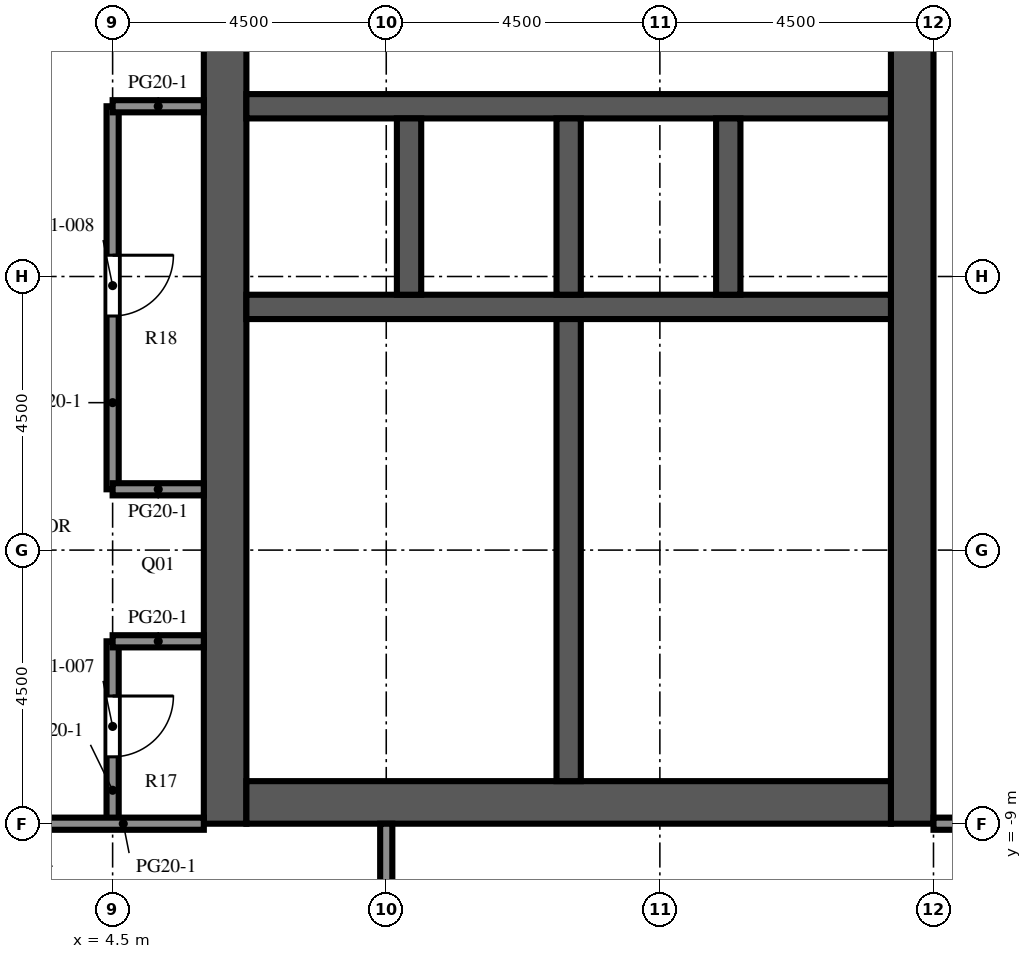
"""IFC4 building model, lengths in metres.
Left out: names, types, materials, properties, quantities, classifications, styles, units other than length and angle.
Written with IfcOpenShell. Run it as: python <this file> out.ifc"""

import sys

from ifc_helpers import new_model, si_unit, direction, frame, frame_2d, origin, place, context, subcontext, project, spatial, rectangle, extrude, element, fill, save


model = new_model("IFC4")
c1 = context("Model", 3, precision=1e-05, world=origin(), true_north=direction((0.0, 1.0)))
c2 = subcontext(c1, "Body", "Model", "MODEL_VIEW")
j1 = project(units=[si_unit("LENGTHUNIT", "METRE"), si_unit("PLANEANGLEUNIT", "RADIAN")], contexts=[c1])
p1 = place(None, origin())
s1 = spatial("IfcSite", under=j1, at=p1, CompositionType="ELEMENT")
p2 = place(p1, origin())
s2 = spatial("IfcBuilding", under=s1, at=p2, CompositionType="ELEMENT")
p3 = place(p2, frame((0.0, 0.0, 274.5)))
s3 = spatial("IfcBuildingStorey", under=s2, at=p3, CompositionType="ELEMENT", Elevation=274.5)
p4 = place(p3, frame((6.35, -9.0, 0.0), z_axis=(0.0, 0.0, 1.0), x_axis=(0.0, 1.0, 0.0)))
e1 = element("IfcWall", 1, at=p4, inside=s3, PredefinedType="SHEAR", context=c2, shape_type="SweptSolid", body=[
    extrude(rectangle(XDim=27.5, YDim=0.7, at=frame_2d((13.75, 0.0))), origin(), (0.0, 0.0, 1.0), 4.1),
])
p5 = place(p4, frame((12.55, 0.0, 0.0)))
e2 = element("IfcOpeningElement", 2, at=p5, cuts=e1, PredefinedType="OPENING", context=c2, shape_type="SweptSolid", body=[
    extrude(rectangle(XDim=2.4, YDim=2.4, at=frame_2d((1.2, 1.2))), frame((0.0, 0.36, 0.0), z_axis=(0.0, -1.0, 0.0), x_axis=(1.0, 0.0, 0.0)), (0.0, 0.0, 1.0), 0.72),
])
p6 = place(p4, frame((3.9, 0.0, 0.0)))
e3 = element("IfcOpeningElement", 3, at=p6, cuts=e1, PredefinedType="OPENING", context=c2, shape_type="SweptSolid", body=[
    extrude(rectangle(XDim=1.2, YDim=2.1, at=frame_2d((0.6, 1.05))), frame((0.0, 0.36, 0.0), z_axis=(0.0, -1.0, 0.0), x_axis=(1.0, 0.0, 0.0)), (0.0, 0.0, 1.0), 0.72),
])
p7 = place(p4, frame((19.46, 0.0, 0.0)))
e4 = element("IfcOpeningElement", 4, at=p7, cuts=e1, PredefinedType="OPENING", context=c2, shape_type="SweptSolid", body=[
    extrude(rectangle(XDim=1.0, YDim=2.1, at=frame_2d((0.5, 1.05))), frame((0.0, 0.36, 0.0), z_axis=(0.0, -1.0, 0.0), x_axis=(1.0, 0.0, 0.0)), (0.0, 0.0, 1.0), 0.72),
])
p8 = place(p4, frame((21.17, 0.0, 0.0)))
e5 = element("IfcOpeningElement", 5, at=p8, cuts=e1, PredefinedType="OPENING", context=c2, shape_type="SweptSolid", body=[
    extrude(rectangle(XDim=1.0, YDim=2.1, at=frame_2d((0.5, 1.05))), frame((0.0, 0.36, 0.0), z_axis=(0.0, -1.0, 0.0), x_axis=(1.0, 0.0, 0.0)), (0.0, 0.0, 1.0), 0.72),
])
p9 = place(p4, frame((23.26, 0.0, 0.0)))
e6 = element("IfcOpeningElement", 6, at=p9, cuts=e1, PredefinedType="OPENING", context=c2, shape_type="SweptSolid", body=[
    extrude(rectangle(XDim=1.0, YDim=2.1, at=frame_2d((0.5, 1.05))), frame((0.0, 0.36, 0.0), z_axis=(0.0, -1.0, 0.0), x_axis=(1.0, 0.0, 0.0)), (0.0, 0.0, 1.0), 0.72),
])
p10 = place(p4, frame((25.35, 0.0, 0.0)))
e7 = element("IfcOpeningElement", 7, at=p10, cuts=e1, PredefinedType="OPENING", context=c2, shape_type="SweptSolid", body=[
    extrude(rectangle(XDim=1.0, YDim=2.1, at=frame_2d((0.5, 1.05))), frame((0.0, 0.36, 0.0), z_axis=(0.0, -1.0, 0.0), x_axis=(1.0, 0.0, 0.0)), (0.0, 0.0, 1.0), 0.72),
])
p11 = place(p3, frame((17.65, -9.0, 0.0), z_axis=(0.0, 0.0, 1.0), x_axis=(0.0, 1.0, 0.0)))
e8 = element("IfcWall", 8, at=p11, inside=s3, PredefinedType="SHEAR", context=c2, shape_type="SweptSolid", body=[
    extrude(rectangle(XDim=27.5, YDim=0.7, at=frame_2d((13.75, 0.0))), origin(), (0.0, 0.0, 1.0), 4.1),
])
p12 = place(p11, frame((12.55, 0.0, 0.0)))
e9 = element("IfcOpeningElement", 9, at=p12, cuts=e8, PredefinedType="OPENING", context=c2, shape_type="SweptSolid", body=[
    extrude(rectangle(XDim=2.4, YDim=2.4, at=frame_2d((1.2, 1.2))), frame((0.0, 0.36, 0.0), z_axis=(0.0, -1.0, 0.0), x_axis=(1.0, 0.0, 0.0)), (0.0, 0.0, 1.0), 0.72),
])
p13 = place(p11, frame((6.825, 0.0, 0.0)))
e10 = element("IfcOpeningElement", 10, at=p13, cuts=e8, PredefinedType="OPENING", context=c2, shape_type="SweptSolid", body=[
    extrude(rectangle(XDim=1.2, YDim=2.1, at=frame_2d((0.6, 1.05))), frame((0.0, 0.36, 0.0), z_axis=(0.0, -1.0, 0.0), x_axis=(1.0, 0.0, 0.0)), (0.0, 0.0, 1.0), 0.72),
])
p14 = place(p11, frame((19.475, 0.0, 0.0)))
e11 = element("IfcOpeningElement", 11, at=p14, cuts=e8, PredefinedType="OPENING", context=c2, shape_type="SweptSolid", body=[
    extrude(rectangle(XDim=1.2, YDim=2.1, at=frame_2d((0.6, 1.05))), frame((0.0, 0.36, 0.0), z_axis=(0.0, -1.0, 0.0), x_axis=(1.0, 0.0, 0.0)), (0.0, 0.0, 1.0), 0.72),
])
p15 = place(p3, frame((6.7, -8.65, 0.0), z_axis=(0.0, 0.0, 1.0), x_axis=(1.0, 0.0, 0.0)))
e12 = element("IfcWall", 12, at=p15, inside=s3, PredefinedType="SHEAR", context=c2, shape_type="SweptSolid", body=[
    extrude(rectangle(XDim=10.6, YDim=0.7, at=frame_2d((5.3, 0.0))), origin(), (0.0, 0.0, 1.0), 4.1),
])
p16 = place(p3, frame((6.7, -0.5, 0.0), z_axis=(0.0, 0.0, 1.0), x_axis=(1.0, 0.0, 0.0)))
e13 = element("IfcWall", 13, at=p16, inside=s3, PredefinedType="SHEAR", context=c2, shape_type="SweptSolid", body=[
    extrude(rectangle(XDim=10.6, YDim=0.4, at=frame_2d((5.3, 0.0))), origin(), (0.0, 0.0, 1.0), 4.1),
])
p17 = place(p3, frame((6.7, 2.8, 0.0), z_axis=(0.0, 0.0, 1.0), x_axis=(1.0, 0.0, 0.0)))
e14 = element("IfcWall", 14, at=p17, inside=s3, PredefinedType="SHEAR", context=c2, shape_type="SweptSolid", body=[
    extrude(rectangle(XDim=10.6, YDim=0.4, at=frame_2d((5.3, 0.0))), origin(), (0.0, 0.0, 1.0), 4.1),
])
p18 = place(p17, frame((0.688, 0.0, 0.0)))
e15 = element("IfcOpeningElement", 15, at=p18, cuts=e14, PredefinedType="OPENING", context=c2, shape_type="SweptSolid", body=[
    extrude(rectangle(XDim=1.1, YDim=2.1, at=frame_2d((0.55, 1.05))), frame((0.0, 0.21, 0.0), z_axis=(0.0, -1.0, 0.0), x_axis=(1.0, 0.0, 0.0)), (0.0, 0.0, 1.0), 0.42),
])
p19 = place(p17, frame((3.438, 0.0, 0.0)))
e16 = element("IfcOpeningElement", 16, at=p19, cuts=e14, PredefinedType="OPENING", context=c2, shape_type="SweptSolid", body=[
    extrude(rectangle(XDim=1.1, YDim=2.1, at=frame_2d((0.55, 1.05))), frame((0.0, 0.21, 0.0), z_axis=(0.0, -1.0, 0.0), x_axis=(1.0, 0.0, 0.0)), (0.0, 0.0, 1.0), 0.42),
])
p20 = place(p17, frame((6.113, 0.0, 0.0)))
e17 = element("IfcOpeningElement", 17, at=p20, cuts=e14, PredefinedType="OPENING", context=c2, shape_type="SweptSolid", body=[
    extrude(rectangle(XDim=1.0, YDim=2.1, at=frame_2d((0.5, 1.05))), frame((0.0, 0.21, 0.0), z_axis=(0.0, -1.0, 0.0), x_axis=(1.0, 0.0, 0.0)), (0.0, 0.0, 1.0), 0.42),
])
p21 = place(p17, frame((8.863, 0.0, 0.0)))
e18 = element("IfcOpeningElement", 18, at=p21, cuts=e14, PredefinedType="OPENING", context=c2, shape_type="SweptSolid", body=[
    extrude(rectangle(XDim=1.0, YDim=2.1, at=frame_2d((0.5, 1.05))), frame((0.0, 0.21, 0.0), z_axis=(0.0, -1.0, 0.0), x_axis=(1.0, 0.0, 0.0)), (0.0, 0.0, 1.0), 0.42),
])
for number, where, z_axis, x_axis in (
    (19, (9.375, -0.3, 0.0), (0.0, 0.0, 1.0), (0.0, 1.0, 0.0)),
    (20, (12.0, -0.3, 0.0), (0.0, 0.0, 1.0), (0.0, 1.0, 0.0)),
    (21, (14.625, -0.3, 0.0), (0.0, 0.0, 1.0), (0.0, 1.0, 0.0)),
):
    element("IfcWall", number, at=place(p3, frame(where, z_axis=z_axis, x_axis=x_axis)), inside=s3, PredefinedType="SHEAR", context=c2, shape_type="SweptSolid", body=[
        extrude(rectangle(XDim=2.9, YDim=0.4, at=frame_2d((1.45, 0.0))), origin(), (0.0, 0.0, 1.0), 4.1),
    ])
p22 = place(p3, frame((12.0, -8.3, 0.0), z_axis=(0.0, 0.0, 1.0), x_axis=(0.0, 1.0, 0.0)))
e22 = element("IfcWall", 22, at=p22, inside=s3, PredefinedType="SHEAR", context=c2, shape_type="SweptSolid", body=[
    extrude(rectangle(XDim=7.6, YDim=0.4, at=frame_2d((3.8, 0.0))), origin(), (0.0, 0.0, 1.0), 4.1),
])
p23 = place(p3, frame((6.7, -6.02, 0.0), z_axis=(0.0, 0.0, 1.0), x_axis=(1.0, 0.0, 0.0)))
e23 = element("IfcWall", 23, at=p23, inside=s3, PredefinedType="PARTITIONING", context=c2, shape_type="SweptSolid", body=[
    extrude(rectangle(XDim=1.6, YDim=0.1, at=frame_2d((0.8, 0.0))), origin(), (0.0, 0.0, 1.0), 3.65),
])
p24 = place(p23, frame((0.3, 0.0, 0.0)))
e24 = element("IfcOpeningElement", 24, at=p24, cuts=e23, PredefinedType="OPENING", context=c2, shape_type="SweptSolid", body=[
    extrude(rectangle(XDim=1.0, YDim=2.1, at=frame_2d((0.5, 1.05))), frame((0.0, 0.06, 0.0), z_axis=(0.0, -1.0, 0.0), x_axis=(1.0, 0.0, 0.0)), (0.0, 0.0, 1.0), 0.12),
])
p25 = place(p3, frame((6.7, -2.98, 0.0), z_axis=(0.0, 0.0, 1.0), x_axis=(1.0, 0.0, 0.0)))
e25 = element("IfcWall", 25, at=p25, inside=s3, PredefinedType="PARTITIONING", context=c2, shape_type="SweptSolid", body=[
    extrude(rectangle(XDim=1.6, YDim=0.1, at=frame_2d((0.8, 0.0))), origin(), (0.0, 0.0, 1.0), 3.65),
])
p26 = place(p25, frame((0.3, 0.0, 0.0)))
e26 = element("IfcOpeningElement", 26, at=p26, cuts=e25, PredefinedType="OPENING", context=c2, shape_type="SweptSolid", body=[
    extrude(rectangle(XDim=1.0, YDim=2.1, at=frame_2d((0.5, 1.05))), frame((0.0, 0.06, 0.0), z_axis=(0.0, -1.0, 0.0), x_axis=(1.0, 0.0, 0.0)), (0.0, 0.0, 1.0), 0.12),
])
p27 = place(p3, frame((8.3, -6.02, 0.0), z_axis=(0.0, 0.0, 1.0), x_axis=(0.0, 1.0, 0.0)))
e27 = element("IfcWall", 27, at=p27, inside=s3, PredefinedType="PARTITIONING", context=c2, shape_type="SweptSolid", body=[
    extrude(rectangle(XDim=3.04, YDim=0.1, at=frame_2d((1.52, 0.0))), origin(), (0.0, 0.0, 1.0), 3.65),
])
p28 = place(p27, frame((1.02, 0.0, 0.0)))
e28 = element("IfcOpeningElement", 28, at=p28, cuts=e27, PredefinedType="OPENING", context=c2, shape_type="SweptSolid", body=[
    extrude(rectangle(XDim=1.0, YDim=2.1, at=frame_2d((0.5, 1.05))), frame((0.0, 0.06, 0.0), z_axis=(0.0, -1.0, 0.0), x_axis=(1.0, 0.0, 0.0)), (0.0, 0.0, 1.0), 0.12),
])
for number, where, z_axis, x_axis in (
    (29, (8.3, -6.02, 0.0), (0.0, 0.0, 1.0), (1.0, 0.0, 0.0)),
    (30, (8.3, -2.98, 0.0), (0.0, 0.0, 1.0), (1.0, 0.0, 0.0)),
):
    element("IfcWall", number, at=place(p3, frame(where, z_axis=z_axis, x_axis=x_axis)), inside=s3, PredefinedType="PARTITIONING", context=c2, shape_type="SweptSolid", body=[
        extrude(rectangle(XDim=3.5, YDim=0.1, at=frame_2d((1.75, 0.0))), origin(), (0.0, 0.0, 1.0), 3.65),
    ])
p29 = place(p3, frame((4.5, -6.0, 0.0), z_axis=(0.0, 0.0, 1.0), x_axis=(0.0, -1.0, 0.0)))
e31 = element("IfcWall", 31, at=p29, inside=s3, PredefinedType="PARTITIONING", context=c2, shape_type="SweptSolid", body=[
    extrude(rectangle(XDim=3.0, YDim=0.2, at=frame_2d((1.5, 0.0))), origin(), (0.0, 0.0, 1.0), 3.65),
])
p30 = place(p29, frame((0.9, 0.0, 0.0)))
e32 = element("IfcOpeningElement", 32, at=p30, cuts=e31, PredefinedType="OPENING", context=c2, shape_type="SweptSolid", body=[
    extrude(rectangle(XDim=1.0, YDim=2.1, at=frame_2d((0.5, 1.05))), frame((0.0, 0.11, 0.0), z_axis=(0.0, -1.0, 0.0), x_axis=(1.0, 0.0, 0.0)), (0.0, 0.0, 1.0), 0.22),
])
p31 = place(p3, frame((4.5, 2.8, 0.0), z_axis=(0.0, 0.0, 1.0), x_axis=(0.0, -1.0, 0.0)))
e33 = element("IfcWall", 33, at=p31, inside=s3, PredefinedType="PARTITIONING", context=c2, shape_type="SweptSolid", body=[
    extrude(rectangle(XDim=6.3, YDim=0.2, at=frame_2d((3.15, 0.0))), origin(), (0.0, 0.0, 1.0), 3.65),
])
p32 = place(p31, frame((2.45, 0.0, 0.0)))
e34 = element("IfcOpeningElement", 34, at=p32, cuts=e33, PredefinedType="OPENING", context=c2, shape_type="SweptSolid", body=[
    extrude(rectangle(XDim=1.0, YDim=2.1, at=frame_2d((0.5, 1.05))), frame((0.0, 0.11, 0.0), z_axis=(0.0, -1.0, 0.0), x_axis=(1.0, 0.0, 0.0)), (0.0, 0.0, 1.0), 0.22),
])
p33 = place(p3, frame((9.0, -17.6, 0.0), z_axis=(0.0, 0.0, 1.0), x_axis=(0.0, 1.0, 0.0)))
e35 = element("IfcWall", 35, at=p33, inside=s3, PredefinedType="PARTITIONING", context=c2, shape_type="SweptSolid", body=[
    extrude(rectangle(XDim=8.6, YDim=0.2, at=frame_2d((4.3, 0.0))), origin(), (0.0, 0.0, 1.0), 3.65),
])
p34 = place(p3, frame((6.0, -9.0, 0.0), z_axis=(0.0, 0.0, 1.0), x_axis=(-1.0, 0.0, 0.0)))
e36 = element("IfcWall", 36, at=p34, inside=s3, PredefinedType="PARTITIONING", context=c2, shape_type="SweptSolid", body=[
    extrude(rectangle(XDim=4.5, YDim=0.2, at=frame_2d((2.25, 0.0))), origin(), (0.0, 0.0, 1.0), 3.65),
])
p35 = place(p34, frame((2.65, 0.0, 0.0)))
e37 = element("IfcOpeningElement", 37, at=p35, cuts=e36, PredefinedType="OPENING", context=c2, shape_type="SweptSolid", body=[
    extrude(rectangle(XDim=1.0, YDim=2.1, at=frame_2d((0.5, 1.05))), frame((0.0, 0.11, 0.0), z_axis=(0.0, -1.0, 0.0), x_axis=(1.0, 0.0, 0.0)), (0.0, 0.0, 1.0), 0.22),
])
p36 = place(p3, frame((22.1, -9.0, 0.0), z_axis=(0.0, 0.0, 1.0), x_axis=(-1.0, 0.0, 0.0)))
e38 = element("IfcWall", 38, at=p36, inside=s3, PredefinedType="PARTITIONING", context=c2, shape_type="SweptSolid", body=[
    extrude(rectangle(XDim=4.1, YDim=0.2, at=frame_2d((2.05, 0.0))), origin(), (0.0, 0.0, 1.0), 3.65),
])
p37 = place(p36, frame((0.75, 0.0, 0.0)))
e39 = element("IfcOpeningElement", 39, at=p37, cuts=e38, PredefinedType="OPENING", context=c2, shape_type="SweptSolid", body=[
    extrude(rectangle(XDim=1.0, YDim=2.1, at=frame_2d((0.5, 1.05))), frame((0.0, 0.11, 0.0), z_axis=(0.0, -1.0, 0.0), x_axis=(1.0, 0.0, 0.0)), (0.0, 0.0, 1.0), 0.22),
])
for number, where, z_axis, x_axis in (
    (40, (4.5, -6.0, 0.0), (0.0, 0.0, 1.0), (1.0, 0.0, 0.0)),
    (41, (4.5, -3.5, 0.0), (0.0, 0.0, 1.0), (1.0, 0.0, 0.0)),
    (42, (4.5, 2.8, 0.0), (0.0, 0.0, 1.0), (1.0, 0.0, 0.0)),
):
    element("IfcWall", number, at=place(p3, frame(where, z_axis=z_axis, x_axis=x_axis)), inside=s3, PredefinedType="PARTITIONING", context=c2, shape_type="SweptSolid", body=[
        extrude(rectangle(XDim=1.5, YDim=0.2, at=frame_2d((0.75, 0.0))), origin(), (0.0, 0.0, 1.0), 3.65),
    ])
p38 = place(p18, origin())
e43 = element("IfcDoor", 43, at=p38, inside=s3, OperationType="DOUBLE_DOOR_SLIDING", PredefinedType="DOOR", context=c2, shape_type="SweptSolid", body=[
    extrude(rectangle(XDim=1.1, YDim=2.1, at=frame_2d((0.55, 1.05))), frame((0.0, 0.025, 0.0), z_axis=(0.0, -1.0, 0.0), x_axis=(1.0, 0.0, 0.0)), (0.0, 0.0, 1.0), 0.05),
])
fill(e15, e43)
p39 = place(p19, origin())
e44 = element("IfcDoor", 44, at=p39, inside=s3, OperationType="DOUBLE_DOOR_SLIDING", PredefinedType="DOOR", context=c2, shape_type="SweptSolid", body=[
    extrude(rectangle(XDim=1.1, YDim=2.1, at=frame_2d((0.55, 1.05))), frame((0.0, 0.025, 0.0), z_axis=(0.0, -1.0, 0.0), x_axis=(1.0, 0.0, 0.0)), (0.0, 0.0, 1.0), 0.05),
])
fill(e16, e44)
p40 = place(p5, origin())
e45 = element("IfcDoor", 45, at=p40, inside=s3, OperationType="DOUBLE_DOOR_DOUBLE_SWING", PredefinedType="DOOR", context=c2, shape_type="SweptSolid", body=[
    extrude(rectangle(XDim=2.4, YDim=2.4, at=frame_2d((1.2, 1.2))), frame((0.0, 0.025, 0.0), z_axis=(0.0, -1.0, 0.0), x_axis=(1.0, 0.0, 0.0)), (0.0, 0.0, 1.0), 0.05),
])
fill(e2, e45)
p41 = place(p12, origin())
e46 = element("IfcDoor", 46, at=p41, inside=s3, OperationType="DOUBLE_DOOR_DOUBLE_SWING", PredefinedType="DOOR", context=c2, shape_type="SweptSolid", body=[
    extrude(rectangle(XDim=2.4, YDim=2.4, at=frame_2d((1.2, 1.2))), frame((0.0, 0.025, 0.0), z_axis=(0.0, -1.0, 0.0), x_axis=(1.0, 0.0, 0.0)), (0.0, 0.0, 1.0), 0.05),
])
fill(e9, e46)
p42 = place(p13, frame((1.2, 0.0, 0.0), z_axis=(0.0, 0.0, 1.0), x_axis=(-1.0, 0.0, 0.0)))
e47 = element("IfcDoor", 47, at=p42, inside=s3, OperationType="SINGLE_SWING_LEFT", PredefinedType="DOOR", context=c2, shape_type="SweptSolid", body=[
    extrude(rectangle(XDim=1.2, YDim=2.1, at=frame_2d((0.6, 1.05))), frame((0.0, 0.025, 0.0), z_axis=(0.0, -1.0, 0.0), x_axis=(1.0, 0.0, 0.0)), (0.0, 0.0, 1.0), 0.05),
])
fill(e10, e47)
p43 = place(p20, origin())
e48 = element("IfcDoor", 48, at=p43, inside=s3, OperationType="SINGLE_SWING_LEFT", PredefinedType="DOOR", context=c2, shape_type="SweptSolid", body=[
    extrude(rectangle(XDim=1.0, YDim=2.1, at=frame_2d((0.5, 1.05))), frame((0.0, 0.025, 0.0), z_axis=(0.0, -1.0, 0.0), x_axis=(1.0, 0.0, 0.0)), (0.0, 0.0, 1.0), 0.05),
])
fill(e17, e48)
p44 = place(p21, origin())
e49 = element("IfcDoor", 49, at=p44, inside=s3, OperationType="SINGLE_SWING_RIGHT", PredefinedType="DOOR", context=c2, shape_type="SweptSolid", body=[
    extrude(rectangle(XDim=1.0, YDim=2.1, at=frame_2d((0.5, 1.05))), frame((0.0, 0.025, 0.0), z_axis=(0.0, -1.0, 0.0), x_axis=(1.0, 0.0, 0.0)), (0.0, 0.0, 1.0), 0.05),
])
fill(e18, e49)
p45 = place(p6, origin())
e50 = element("IfcDoor", 50, at=p45, inside=s3, OperationType="SINGLE_SWING_RIGHT", PredefinedType="DOOR", context=c2, shape_type="SweptSolid", body=[
    extrude(rectangle(XDim=1.2, YDim=2.1, at=frame_2d((0.6, 1.05))), frame((0.0, -0.275, 0.0), z_axis=(0.0, -1.0, 0.0), x_axis=(1.0, 0.0, 0.0)), (0.0, 0.0, 1.0), 0.05),
])
fill(e3, e50)
p46 = place(p24, origin())
e51 = element("IfcDoor", 51, at=p46, inside=s3, OperationType="SINGLE_SWING_LEFT", PredefinedType="DOOR", context=c2, shape_type="SweptSolid", body=[
    extrude(rectangle(XDim=1.0, YDim=2.1, at=frame_2d((0.5, 1.05))), frame((0.0, 0.025, 0.0), z_axis=(0.0, -1.0, 0.0), x_axis=(1.0, 0.0, 0.0)), (0.0, 0.0, 1.0), 0.05),
])
fill(e24, e51)
p47 = place(p26, origin())
e52 = element("IfcDoor", 52, at=p47, inside=s3, OperationType="SINGLE_SWING_RIGHT", PredefinedType="DOOR", context=c2, shape_type="SweptSolid", body=[
    extrude(rectangle(XDim=1.0, YDim=2.1, at=frame_2d((0.5, 1.05))), frame((0.0, 0.025, 0.0), z_axis=(0.0, -1.0, 0.0), x_axis=(1.0, 0.0, 0.0)), (0.0, 0.0, 1.0), 0.05),
])
fill(e26, e52)
p48 = place(p28, origin())
e53 = element("IfcDoor", 53, at=p48, inside=s3, OperationType="SINGLE_SWING_LEFT", PredefinedType="DOOR", context=c2, shape_type="SweptSolid", body=[
    extrude(rectangle(XDim=1.0, YDim=2.1, at=frame_2d((0.5, 1.05))), frame((0.0, 0.025, 0.0), z_axis=(0.0, -1.0, 0.0), x_axis=(1.0, 0.0, 0.0)), (0.0, 0.0, 1.0), 0.05),
])
fill(e28, e53)
p49 = place(p30, origin())
e54 = element("IfcDoor", 54, at=p49, inside=s3, OperationType="SINGLE_SWING_LEFT", PredefinedType="DOOR", context=c2, shape_type="SweptSolid", body=[
    extrude(rectangle(XDim=1.0, YDim=2.1, at=frame_2d((0.5, 1.05))), frame((0.0, 0.025, 0.0), z_axis=(0.0, -1.0, 0.0), x_axis=(1.0, 0.0, 0.0)), (0.0, 0.0, 1.0), 0.05),
])
fill(e32, e54)
p50 = place(p32, origin())
e55 = element("IfcDoor", 55, at=p50, inside=s3, OperationType="SINGLE_SWING_LEFT", PredefinedType="DOOR", context=c2, shape_type="SweptSolid", body=[
    extrude(rectangle(XDim=1.0, YDim=2.1, at=frame_2d((0.5, 1.05))), frame((0.0, 0.025, 0.0), z_axis=(0.0, -1.0, 0.0), x_axis=(1.0, 0.0, 0.0)), (0.0, 0.0, 1.0), 0.05),
])
fill(e34, e55)
save(model, sys.argv[1])
